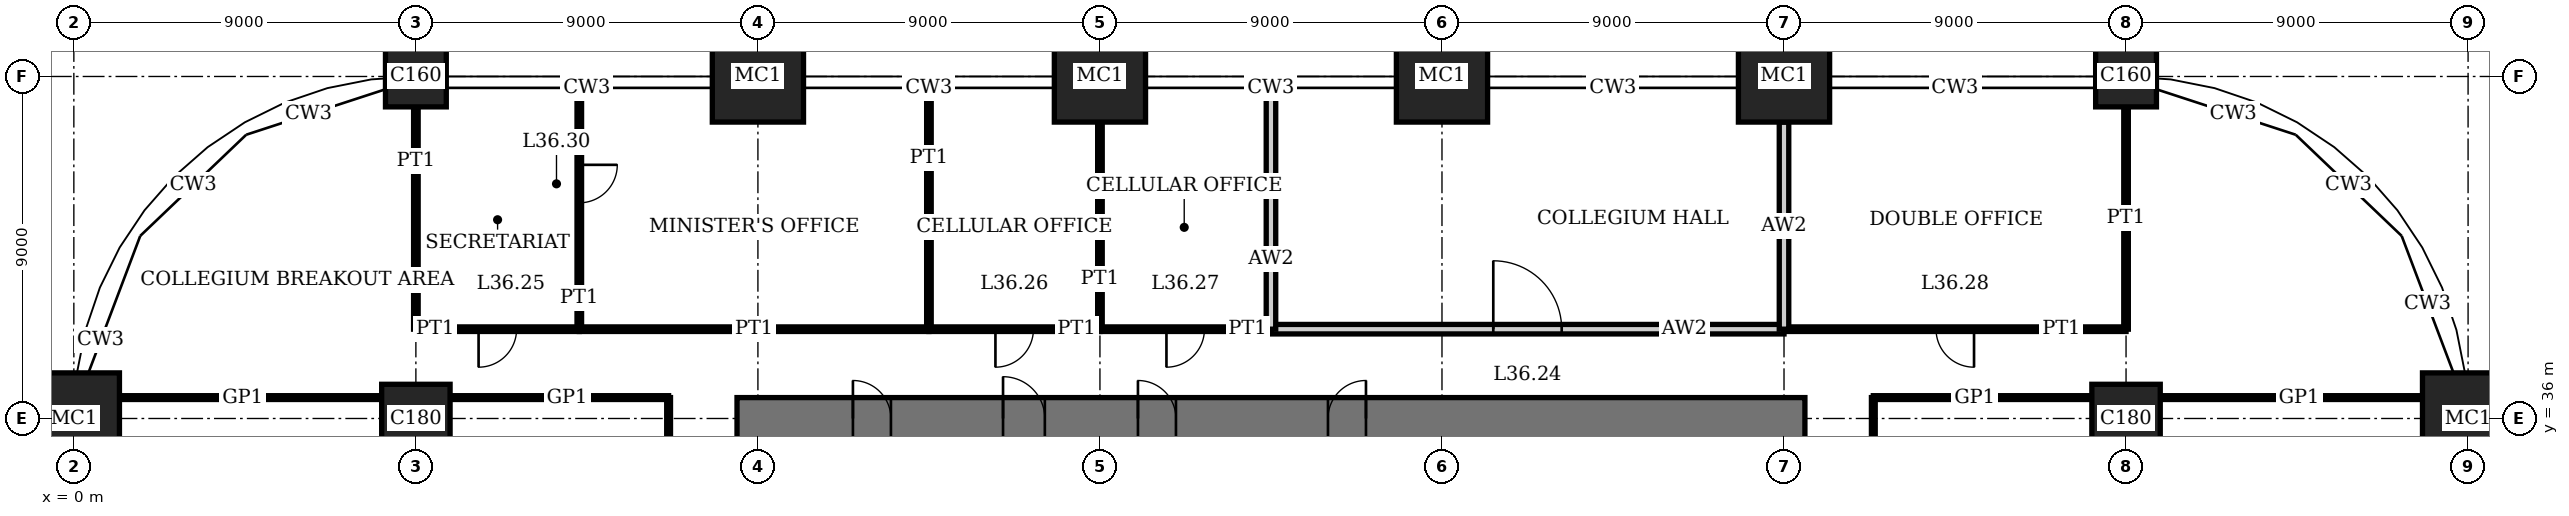
"""IFC4 building model, lengths in metres.
Left out: names, types, materials, properties, quantities, classifications, styles, units other than length and angle.
Written with IfcOpenShell. Run it as: python <this file> out.ifc"""

import sys

from ifc_helpers import new_model, si_unit, direction, frame, frame_2d, origin, origin_2d, place, context, subcontext, project, spatial, rectangle, extrude, element, fill, save


model = new_model("IFC4")
c1 = context("Model", 3, precision=1e-05, world=origin(), true_north=direction((0.0, 1.0)))
c2 = subcontext(c1, "Body", "Model", "MODEL_VIEW")
j1 = project(units=[si_unit("LENGTHUNIT", "METRE"), si_unit("PLANEANGLEUNIT", "RADIAN")], contexts=[c1])
p1 = place(None, origin())
s1 = spatial("IfcSite", under=j1, at=p1, CompositionType="ELEMENT")
p2 = place(p1, origin())
s2 = spatial("IfcBuilding", under=s1, at=p2, CompositionType="ELEMENT")
p3 = place(p2, frame((0.0, 0.0, 149.0)))
s3 = spatial("IfcBuildingStorey", under=s2, at=p3, CompositionType="ELEMENT", Elevation=149.0)
p4 = place(p3, frame((0.0, 36.0, 0.0), z_axis=(0.0, 0.0, 1.0), x_axis=(1.0, 0.0, 0.0)))
e1 = element("IfcColumn", 1, at=p4, inside=s3, PredefinedType="COLUMN", context=c2, shape_type="SweptSolid", body=[
    extrude(rectangle(XDim=2.4, YDim=2.4, at=origin_2d()), origin(), (0.0, 0.0, 1.0), 4.0),
])
p5 = place(p3, frame((9.0, 36.0, 0.0), z_axis=(0.0, 0.0, 1.0), x_axis=(1.0, 0.0, 0.0)))
e2 = element("IfcColumn", 2, at=p5, inside=s3, PredefinedType="COLUMN", context=c2, shape_type="SweptSolid", body=[
    extrude(rectangle(XDim=1.8, YDim=1.8, at=origin_2d()), origin(), (0.0, 0.0, 1.0), 4.0),
])
p6 = place(p3, frame((9.0, 45.0, 0.0), z_axis=(0.0, 0.0, 1.0), x_axis=(1.0, 0.0, 0.0)))
e3 = element("IfcColumn", 3, at=p6, inside=s3, PredefinedType="COLUMN", context=c2, shape_type="SweptSolid", body=[
    extrude(rectangle(XDim=1.6, YDim=1.6, at=origin_2d()), origin(), (0.0, 0.0, 1.0), 4.0),
])
for number, where, z_axis, x_axis in (
    (4, (18.0, 45.0, 0.0), (0.0, 0.0, 1.0), (1.0, 0.0, 0.0)),
    (5, (27.0, 45.0, 0.0), (0.0, 0.0, 1.0), (1.0, 0.0, 0.0)),
    (6, (36.0, 45.0, 0.0), (0.0, 0.0, 1.0), (1.0, 0.0, 0.0)),
    (7, (45.0, 45.0, 0.0), (0.0, 0.0, 1.0), (1.0, 0.0, 0.0)),
):
    element("IfcColumn", number, at=place(p3, frame(where, z_axis=z_axis, x_axis=x_axis)), inside=s3, PredefinedType="COLUMN", context=c2, shape_type="SweptSolid", body=[
        extrude(rectangle(XDim=2.4, YDim=2.4, at=origin_2d()), origin(), (0.0, 0.0, 1.0), 4.0),
    ])
p7 = place(p3, frame((54.0, 36.0, 0.0), z_axis=(0.0, 0.0, 1.0), x_axis=(1.0, 0.0, 0.0)))
e8 = element("IfcColumn", 8, at=p7, inside=s3, PredefinedType="COLUMN", context=c2, shape_type="SweptSolid", body=[
    extrude(rectangle(XDim=1.8, YDim=1.8, at=origin_2d()), origin(), (0.0, 0.0, 1.0), 4.0),
])
p8 = place(p3, frame((54.0, 45.0, 0.0), z_axis=(0.0, 0.0, 1.0), x_axis=(1.0, 0.0, 0.0)))
e9 = element("IfcColumn", 9, at=p8, inside=s3, PredefinedType="COLUMN", context=c2, shape_type="SweptSolid", body=[
    extrude(rectangle(XDim=1.6, YDim=1.6, at=origin_2d()), origin(), (0.0, 0.0, 1.0), 4.0),
])
p9 = place(p3, frame((63.0, 36.0, 0.0), z_axis=(0.0, 0.0, 1.0), x_axis=(1.0, 0.0, 0.0)))
e10 = element("IfcColumn", 10, at=p9, inside=s3, PredefinedType="COLUMN", context=c2, shape_type="SweptSolid", body=[
    extrude(rectangle(XDim=2.4, YDim=2.4, at=origin_2d()), origin(), (0.0, 0.0, 1.0), 4.0),
])
p10 = place(p3, frame((45.55, 36.0, 0.0), z_axis=(0.0, 0.0, 1.0), x_axis=(-1.0, 0.0, 0.0)))
e11 = element("IfcWall", 11, at=p10, inside=s3, PredefinedType="SHEAR", context=c2, shape_type="SweptSolid", body=[
    extrude(rectangle(XDim=28.1, YDim=1.1, at=frame_2d((14.05, 0.0))), origin(), (0.0, 0.0, 1.0), 4.0),
])
p11 = place(p10, frame((11.55, 0.0, 0.0)))
e12 = element("IfcOpeningElement", 12, at=p11, cuts=e11, PredefinedType="OPENING", context=c2, shape_type="SweptSolid", body=[
    extrude(rectangle(XDim=1.0, YDim=2.4, at=frame_2d((0.5, 1.2))), frame((0.0, 0.56, 0.0), z_axis=(0.0, -1.0, 0.0), x_axis=(1.0, 0.0, 0.0)), (0.0, 0.0, 1.0), 1.12),
])
p12 = place(p10, frame((16.55, 0.0, 0.0)))
e13 = element("IfcOpeningElement", 13, at=p12, cuts=e11, PredefinedType="OPENING", context=c2, shape_type="SweptSolid", body=[
    extrude(rectangle(XDim=1.0, YDim=2.4, at=frame_2d((0.5, 1.2))), frame((0.0, 0.56, 0.0), z_axis=(0.0, -1.0, 0.0), x_axis=(1.0, 0.0, 0.0)), (0.0, 0.0, 1.0), 1.12),
])
p13 = place(p10, frame((20.0, 0.0, 0.0)))
e14 = element("IfcOpeningElement", 14, at=p13, cuts=e11, PredefinedType="OPENING", context=c2, shape_type="SweptSolid", body=[
    extrude(rectangle(XDim=1.1, YDim=2.4, at=frame_2d((0.55, 1.2))), frame((0.0, 0.56, 0.0), z_axis=(0.0, -1.0, 0.0), x_axis=(1.0, 0.0, 0.0)), (0.0, 0.0, 1.0), 1.12),
])
p14 = place(p10, frame((24.05, 0.0, 0.0)))
e15 = element("IfcOpeningElement", 15, at=p14, cuts=e11, PredefinedType="OPENING", context=c2, shape_type="SweptSolid", body=[
    extrude(rectangle(XDim=1.0, YDim=2.4, at=frame_2d((0.5, 1.2))), frame((0.0, 0.56, 0.0), z_axis=(0.0, -1.0, 0.0), x_axis=(1.0, 0.0, 0.0)), (0.0, 0.0, 1.0), 1.12),
])
p15 = place(p3, frame((1.2, 36.55, 0.0), z_axis=(0.0, 0.0, 1.0), x_axis=(1.0, 0.0, 0.0)))
e16 = element("IfcWall", 16, at=p15, inside=s3, PredefinedType="PARTITIONING", context=c2, shape_type="SweptSolid", body=[
    extrude(rectangle(XDim=6.9, YDim=0.1, at=frame_2d((3.45, 0.0))), origin(), (0.0, 0.0, 1.0), 3.05),
])
for number, where, z_axis, x_axis in (
    (17, (9.9, 36.55, 0.0), (0.0, 0.0, 1.0), (1.0, 0.0, 0.0)),
    (18, (47.35, 36.55, 0.0), (0.0, 0.0, 1.0), (1.0, 0.0, 0.0)),
):
    element("IfcWall", number, at=place(p3, frame(where, z_axis=z_axis, x_axis=x_axis)), inside=s3, PredefinedType="PARTITIONING", context=c2, shape_type="SweptSolid", body=[
        extrude(rectangle(XDim=5.75, YDim=0.1, at=frame_2d((2.875, 0.0))), origin(), (0.0, 0.0, 1.0), 3.05),
    ])
p16 = place(p3, frame((54.9, 36.55, 0.0), z_axis=(0.0, 0.0, 1.0), x_axis=(1.0, 0.0, 0.0)))
e19 = element("IfcWall", 19, at=p16, inside=s3, PredefinedType="PARTITIONING", context=c2, shape_type="SweptSolid", body=[
    extrude(rectangle(XDim=6.9, YDim=0.1, at=frame_2d((3.45, 0.0))), origin(), (0.0, 0.0, 1.0), 3.05),
])
p17 = place(p3, frame((31.5, 38.35, 0.0), z_axis=(0.0, 0.0, 1.0), x_axis=(1.0, 0.0, 0.0)))
e20 = element("IfcWall", 20, at=p17, inside=s3, PredefinedType="PARTITIONING", context=c2, shape_type="SweptSolid", body=[
    extrude(rectangle(XDim=13.5, YDim=0.25, at=frame_2d((6.75, 0.0))), origin(), (0.0, 0.0, 1.0), 3.75),
])
p18 = place(p17, frame((5.85, 0.0, 0.0)))
e21 = element("IfcOpeningElement", 21, at=p18, cuts=e20, PredefinedType="OPENING", context=c2, shape_type="SweptSolid", body=[
    extrude(rectangle(XDim=1.8, YDim=2.4, at=frame_2d((0.9, 1.2))), frame((0.0, 0.135, 0.0), z_axis=(0.0, -1.0, 0.0), x_axis=(1.0, 0.0, 0.0)), (0.0, 0.0, 1.0), 0.27),
])
p19 = place(p3, frame((9.0, 38.35, 0.0), z_axis=(0.0, 0.0, 1.0), x_axis=(1.0, 0.0, 0.0)))
e22 = element("IfcWall", 22, at=p19, inside=s3, PredefinedType="PARTITIONING", context=c2, shape_type="SweptSolid", body=[
    extrude(rectangle(XDim=4.3, YDim=0.12, at=frame_2d((2.15, 0.0))), origin(), (0.0, 0.0, 1.0), 3.75),
])
p20 = place(p19, frame((1.65, 0.0, 0.0)))
e23 = element("IfcOpeningElement", 23, at=p20, cuts=e22, PredefinedType="OPENING", context=c2, shape_type="SweptSolid", body=[
    extrude(rectangle(XDim=1.0, YDim=2.4, at=frame_2d((0.5, 1.2))), frame((0.0, 0.07, 0.0), z_axis=(0.0, -1.0, 0.0), x_axis=(1.0, 0.0, 0.0)), (0.0, 0.0, 1.0), 0.14),
])
p21 = place(p3, frame((13.3, 38.35, 0.0), z_axis=(0.0, 0.0, 1.0), x_axis=(1.0, 0.0, 0.0)))
e24 = element("IfcWall", 24, at=p21, inside=s3, PredefinedType="PARTITIONING", context=c2, shape_type="SweptSolid", body=[
    extrude(rectangle(XDim=9.2, YDim=0.12, at=frame_2d((4.6, 0.0))), origin(), (0.0, 0.0, 1.0), 3.75),
])
p22 = place(p3, frame((22.5, 38.35, 0.0), z_axis=(0.0, 0.0, 1.0), x_axis=(1.0, 0.0, 0.0)))
e25 = element("IfcWall", 25, at=p22, inside=s3, PredefinedType="PARTITIONING", context=c2, shape_type="SweptSolid", body=[
    extrude(rectangle(XDim=4.5, YDim=0.12, at=frame_2d((2.25, 0.0))), origin(), (0.0, 0.0, 1.0), 3.75),
])
p23 = place(p22, frame((1.75, 0.0, 0.0)))
e26 = element("IfcOpeningElement", 26, at=p23, cuts=e25, PredefinedType="OPENING", context=c2, shape_type="SweptSolid", body=[
    extrude(rectangle(XDim=1.0, YDim=2.4, at=frame_2d((0.5, 1.2))), frame((0.0, 0.07, 0.0), z_axis=(0.0, -1.0, 0.0), x_axis=(1.0, 0.0, 0.0)), (0.0, 0.0, 1.0), 0.14),
])
p24 = place(p3, frame((27.0, 38.35, 0.0), z_axis=(0.0, 0.0, 1.0), x_axis=(1.0, 0.0, 0.0)))
e27 = element("IfcWall", 27, at=p24, inside=s3, PredefinedType="PARTITIONING", context=c2, shape_type="SweptSolid", body=[
    extrude(rectangle(XDim=4.5, YDim=0.12, at=frame_2d((2.25, 0.0))), origin(), (0.0, 0.0, 1.0), 3.75),
])
p25 = place(p24, frame((1.75, 0.0, 0.0)))
e28 = element("IfcOpeningElement", 28, at=p25, cuts=e27, PredefinedType="OPENING", context=c2, shape_type="SweptSolid", body=[
    extrude(rectangle(XDim=1.0, YDim=2.4, at=frame_2d((0.5, 1.2))), frame((0.0, 0.07, 0.0), z_axis=(0.0, -1.0, 0.0), x_axis=(1.0, 0.0, 0.0)), (0.0, 0.0, 1.0), 0.14),
])
p26 = place(p3, frame((45.0, 38.35, 0.0), z_axis=(0.0, 0.0, 1.0), x_axis=(1.0, 0.0, 0.0)))
e29 = element("IfcWall", 29, at=p26, inside=s3, PredefinedType="PARTITIONING", context=c2, shape_type="SweptSolid", body=[
    extrude(rectangle(XDim=9.0, YDim=0.12, at=frame_2d((4.5, 0.0))), origin(), (0.0, 0.0, 1.0), 3.75),
])
p27 = place(p26, frame((4.0, 0.0, 0.0)))
e30 = element("IfcOpeningElement", 30, at=p27, cuts=e29, PredefinedType="OPENING", context=c2, shape_type="SweptSolid", body=[
    extrude(rectangle(XDim=1.0, YDim=2.4, at=frame_2d((0.5, 1.2))), frame((0.0, 0.07, 0.0), z_axis=(0.0, -1.0, 0.0), x_axis=(1.0, 0.0, 0.0)), (0.0, 0.0, 1.0), 0.14),
])
p28 = place(p3, frame((9.0, 38.35, 0.0), z_axis=(0.0, 0.0, 1.0), x_axis=(0.0, 1.0, 0.0)))
e31 = element("IfcWall", 31, at=p28, inside=s3, PredefinedType="PARTITIONING", context=c2, shape_type="SweptSolid", body=[
    extrude(rectangle(XDim=5.85, YDim=0.12, at=frame_2d((2.925, 0.0))), origin(), (0.0, 0.0, 1.0), 3.05),
])
p29 = place(p3, frame((13.3, 38.35, 0.0), z_axis=(0.0, 0.0, 1.0), x_axis=(0.0, 1.0, 0.0)))
e32 = element("IfcWall", 32, at=p29, inside=s3, PredefinedType="PARTITIONING", context=c2, shape_type="SweptSolid", body=[
    extrude(rectangle(XDim=6.34, YDim=0.12, at=frame_2d((3.17, 0.0))), origin(), (0.0, 0.0, 1.0), 3.75),
])
p30 = place(p29, frame((3.325, 0.0, 0.0)))
e33 = element("IfcOpeningElement", 33, at=p30, cuts=e32, PredefinedType="OPENING", context=c2, shape_type="SweptSolid", body=[
    extrude(rectangle(XDim=1.0, YDim=2.4, at=frame_2d((0.5, 1.2))), frame((0.0, 0.07, 0.0), z_axis=(0.0, -1.0, 0.0), x_axis=(1.0, 0.0, 0.0)), (0.0, 0.0, 1.0), 0.14),
])
p31 = place(p3, frame((15.65, 27.0, 0.0), z_axis=(0.0, 0.0, 1.0), x_axis=(0.0, 1.0, 0.0)))
e34 = element("IfcWall", 34, at=p31, inside=s3, PredefinedType="PARTITIONING", context=c2, shape_type="SweptSolid", body=[
    extrude(rectangle(XDim=9.55, YDim=0.1, at=frame_2d((4.775, 0.0))), origin(), (0.0, 0.0, 1.0), 3.75),
])
p32 = place(p3, frame((22.5, 38.35, 0.0), z_axis=(0.0, 0.0, 1.0), x_axis=(0.0, 1.0, 0.0)))
e35 = element("IfcWall", 35, at=p32, inside=s3, PredefinedType="PARTITIONING", context=c2, shape_type="SweptSolid", body=[
    extrude(rectangle(XDim=6.34, YDim=0.12, at=frame_2d((3.17, 0.0))), origin(), (0.0, 0.0, 1.0), 3.75),
])
p33 = place(p3, frame((27.0, 38.35, 0.0), z_axis=(0.0, 0.0, 1.0), x_axis=(0.0, 1.0, 0.0)))
e36 = element("IfcWall", 36, at=p33, inside=s3, PredefinedType="PARTITIONING", context=c2, shape_type="SweptSolid", body=[
    extrude(rectangle(XDim=5.45, YDim=0.12, at=frame_2d((2.725, 0.0))), origin(), (0.0, 0.0, 1.0), 3.05),
])
p34 = place(p3, frame((31.5, 38.35, 0.0), z_axis=(0.0, 0.0, 1.0), x_axis=(0.0, 1.0, 0.0)))
e37 = element("IfcWall", 37, at=p34, inside=s3, PredefinedType="PARTITIONING", context=c2, shape_type="SweptSolid", body=[
    extrude(rectangle(XDim=6.34, YDim=0.25, at=frame_2d((3.17, 0.0))), origin(), (0.0, 0.0, 1.0), 3.75),
])
p35 = place(p3, frame((45.0, 38.35, 0.0), z_axis=(0.0, 0.0, 1.0), x_axis=(0.0, 1.0, 0.0)))
e38 = element("IfcWall", 38, at=p35, inside=s3, PredefinedType="PARTITIONING", context=c2, shape_type="SweptSolid", body=[
    extrude(rectangle(XDim=5.45, YDim=0.25, at=frame_2d((2.725, 0.0))), origin(), (0.0, 0.0, 1.0), 3.05),
])
p36 = place(p3, frame((47.35, 31.5, 0.0), z_axis=(0.0, 0.0, 1.0), x_axis=(0.0, 1.0, 0.0)))
e39 = element("IfcWall", 39, at=p36, inside=s3, PredefinedType="PARTITIONING", context=c2, shape_type="SweptSolid", body=[
    extrude(rectangle(XDim=5.05, YDim=0.1, at=frame_2d((2.525, 0.0))), origin(), (0.0, 0.0, 1.0), 3.75),
])
p37 = place(p3, frame((54.0, 38.35, 0.0), z_axis=(0.0, 0.0, 1.0), x_axis=(0.0, 1.0, 0.0)))
e40 = element("IfcWall", 40, at=p37, inside=s3, PredefinedType="PARTITIONING", context=c2, shape_type="SweptSolid", body=[
    extrude(rectangle(XDim=5.85, YDim=0.12, at=frame_2d((2.925, 0.0))), origin(), (0.0, 0.0, 1.0), 3.05),
])
p38 = place(p11, origin())
e41 = element("IfcDoor", 41, at=p38, inside=s3, OperationType="SINGLE_SWING_LEFT", PredefinedType="DOOR", context=c2, shape_type="SweptSolid", body=[
    extrude(rectangle(XDim=1.0, YDim=2.4, at=frame_2d((0.5, 1.2))), frame((0.0, 0.025, 0.0), z_axis=(0.0, -1.0, 0.0), x_axis=(1.0, 0.0, 0.0)), (0.0, 0.0, 1.0), 0.05),
    extrude(rectangle(XDim=0.04, YDim=2.4, at=frame_2d((0.02, 1.2))), frame((0.0, 0.4, 0.0), z_axis=(0.0, -1.0, 0.0), x_axis=(1.0, 0.0, 0.0)), (0.0, 0.0, 1.0), 0.8),
    extrude(rectangle(XDim=0.04, YDim=2.4, at=frame_2d((0.98, 1.2))), frame((0.0, 0.4, 0.0), z_axis=(0.0, -1.0, 0.0), x_axis=(1.0, 0.0, 0.0)), (0.0, 0.0, 1.0), 0.8),
    extrude(rectangle(XDim=1.0, YDim=0.04, at=frame_2d((0.5, 2.38))), frame((0.0, 0.4, 0.0), z_axis=(0.0, -1.0, 0.0), x_axis=(1.0, 0.0, 0.0)), (0.0, 0.0, 1.0), 0.8),
])
fill(e12, e41)
p39 = place(p12, origin())
e42 = element("IfcDoor", 42, at=p39, inside=s3, OperationType="SINGLE_SWING_RIGHT", PredefinedType="DOOR", context=c2, shape_type="SweptSolid", body=[
    extrude(rectangle(XDim=1.0, YDim=2.4, at=frame_2d((0.5, 1.2))), frame((0.0, 0.025, 0.0), z_axis=(0.0, -1.0, 0.0), x_axis=(1.0, 0.0, 0.0)), (0.0, 0.0, 1.0), 0.05),
    extrude(rectangle(XDim=0.04, YDim=2.4, at=frame_2d((0.02, 1.2))), frame((0.0, 0.4, 0.0), z_axis=(0.0, -1.0, 0.0), x_axis=(1.0, 0.0, 0.0)), (0.0, 0.0, 1.0), 0.8),
    extrude(rectangle(XDim=0.04, YDim=2.4, at=frame_2d((0.98, 1.2))), frame((0.0, 0.4, 0.0), z_axis=(0.0, -1.0, 0.0), x_axis=(1.0, 0.0, 0.0)), (0.0, 0.0, 1.0), 0.8),
    extrude(rectangle(XDim=1.0, YDim=0.04, at=frame_2d((0.5, 2.38))), frame((0.0, 0.4, 0.0), z_axis=(0.0, -1.0, 0.0), x_axis=(1.0, 0.0, 0.0)), (0.0, 0.0, 1.0), 0.8),
])
fill(e13, e42)
p40 = place(p13, origin())
e43 = element("IfcDoor", 43, at=p40, inside=s3, OperationType="SINGLE_SWING_RIGHT", PredefinedType="DOOR", context=c2, shape_type="SweptSolid", body=[
    extrude(rectangle(XDim=1.1, YDim=2.4, at=frame_2d((0.55, 1.2))), frame((0.0, 0.025, 0.0), z_axis=(0.0, -1.0, 0.0), x_axis=(1.0, 0.0, 0.0)), (0.0, 0.0, 1.0), 0.05),
    extrude(rectangle(XDim=0.04, YDim=2.4, at=frame_2d((0.02, 1.2))), frame((0.0, 0.44, 0.0), z_axis=(0.0, -1.0, 0.0), x_axis=(1.0, 0.0, 0.0)), (0.0, 0.0, 1.0), 0.88),
    extrude(rectangle(XDim=0.04, YDim=2.4, at=frame_2d((1.08, 1.2))), frame((0.0, 0.44, 0.0), z_axis=(0.0, -1.0, 0.0), x_axis=(1.0, 0.0, 0.0)), (0.0, 0.0, 1.0), 0.88),
    extrude(rectangle(XDim=1.1, YDim=0.04, at=frame_2d((0.55, 2.38))), frame((0.0, 0.44, 0.0), z_axis=(0.0, -1.0, 0.0), x_axis=(1.0, 0.0, 0.0)), (0.0, 0.0, 1.0), 0.88),
])
fill(e14, e43)
p41 = place(p14, origin())
e44 = element("IfcDoor", 44, at=p41, inside=s3, OperationType="SINGLE_SWING_RIGHT", PredefinedType="DOOR", context=c2, shape_type="SweptSolid", body=[
    extrude(rectangle(XDim=1.0, YDim=2.4, at=frame_2d((0.5, 1.2))), frame((0.0, 0.025, 0.0), z_axis=(0.0, -1.0, 0.0), x_axis=(1.0, 0.0, 0.0)), (0.0, 0.0, 1.0), 0.05),
    extrude(rectangle(XDim=0.04, YDim=2.4, at=frame_2d((0.02, 1.2))), frame((0.0, 0.4, 0.0), z_axis=(0.0, -1.0, 0.0), x_axis=(1.0, 0.0, 0.0)), (0.0, 0.0, 1.0), 0.8),
    extrude(rectangle(XDim=0.04, YDim=2.4, at=frame_2d((0.98, 1.2))), frame((0.0, 0.4, 0.0), z_axis=(0.0, -1.0, 0.0), x_axis=(1.0, 0.0, 0.0)), (0.0, 0.0, 1.0), 0.8),
    extrude(rectangle(XDim=1.0, YDim=0.04, at=frame_2d((0.5, 2.38))), frame((0.0, 0.4, 0.0), z_axis=(0.0, -1.0, 0.0), x_axis=(1.0, 0.0, 0.0)), (0.0, 0.0, 1.0), 0.8),
])
fill(e15, e44)
p42 = place(p18, origin())
e45 = element("IfcDoor", 45, at=p42, inside=s3, OperationType="DOUBLE_DOOR_SINGLE_SWING", PredefinedType="DOOR", context=c2, shape_type="SweptSolid", body=[
    extrude(rectangle(XDim=1.8, YDim=2.4, at=frame_2d((0.9, 1.2))), frame((0.0, 0.025, 0.0), z_axis=(0.0, -1.0, 0.0), x_axis=(1.0, 0.0, 0.0)), (0.0, 0.0, 1.0), 0.05),
])
fill(e21, e45)
p43 = place(p20, origin())
e46 = element("IfcDoor", 46, at=p43, inside=s3, OperationType="SINGLE_SWING_LEFT", PredefinedType="DOOR", context=c2, shape_type="SweptSolid", body=[
    extrude(rectangle(XDim=1.0, YDim=2.4, at=frame_2d((0.5, 1.2))), frame((0.0, 0.025, 0.0), z_axis=(0.0, -1.0, 0.0), x_axis=(1.0, 0.0, 0.0)), (0.0, 0.0, 1.0), 0.05),
])
fill(e23, e46)
p44 = place(p23, origin())
e47 = element("IfcDoor", 47, at=p44, inside=s3, OperationType="SINGLE_SWING_LEFT", PredefinedType="DOOR", context=c2, shape_type="SweptSolid", body=[
    extrude(rectangle(XDim=1.0, YDim=2.4, at=frame_2d((0.5, 1.2))), frame((0.0, 0.025, 0.0), z_axis=(0.0, -1.0, 0.0), x_axis=(1.0, 0.0, 0.0)), (0.0, 0.0, 1.0), 0.05),
])
fill(e26, e47)
p45 = place(p25, origin())
e48 = element("IfcDoor", 48, at=p45, inside=s3, OperationType="SINGLE_SWING_LEFT", PredefinedType="DOOR", context=c2, shape_type="SweptSolid", body=[
    extrude(rectangle(XDim=1.0, YDim=2.4, at=frame_2d((0.5, 1.2))), frame((0.0, 0.025, 0.0), z_axis=(0.0, -1.0, 0.0), x_axis=(1.0, 0.0, 0.0)), (0.0, 0.0, 1.0), 0.05),
])
fill(e28, e48)
p46 = place(p27, origin())
e49 = element("IfcDoor", 49, at=p46, inside=s3, OperationType="SINGLE_SWING_RIGHT", PredefinedType="DOOR", context=c2, shape_type="SweptSolid", body=[
    extrude(rectangle(XDim=1.0, YDim=2.4, at=frame_2d((0.5, 1.2))), frame((0.0, 0.025, 0.0), z_axis=(0.0, -1.0, 0.0), x_axis=(1.0, 0.0, 0.0)), (0.0, 0.0, 1.0), 0.05),
])
fill(e30, e49)
p47 = place(p30, origin())
e50 = element("IfcDoor", 50, at=p47, inside=s3, OperationType="SINGLE_SWING_RIGHT", PredefinedType="DOOR", context=c2, shape_type="SweptSolid", body=[
    extrude(rectangle(XDim=1.0, YDim=2.4, at=frame_2d((0.5, 1.2))), frame((0.0, 0.025, 0.0), z_axis=(0.0, -1.0, 0.0), x_axis=(1.0, 0.0, 0.0)), (0.0, 0.0, 1.0), 0.05),
])
fill(e33, e50)
save(model, sys.argv[1])
